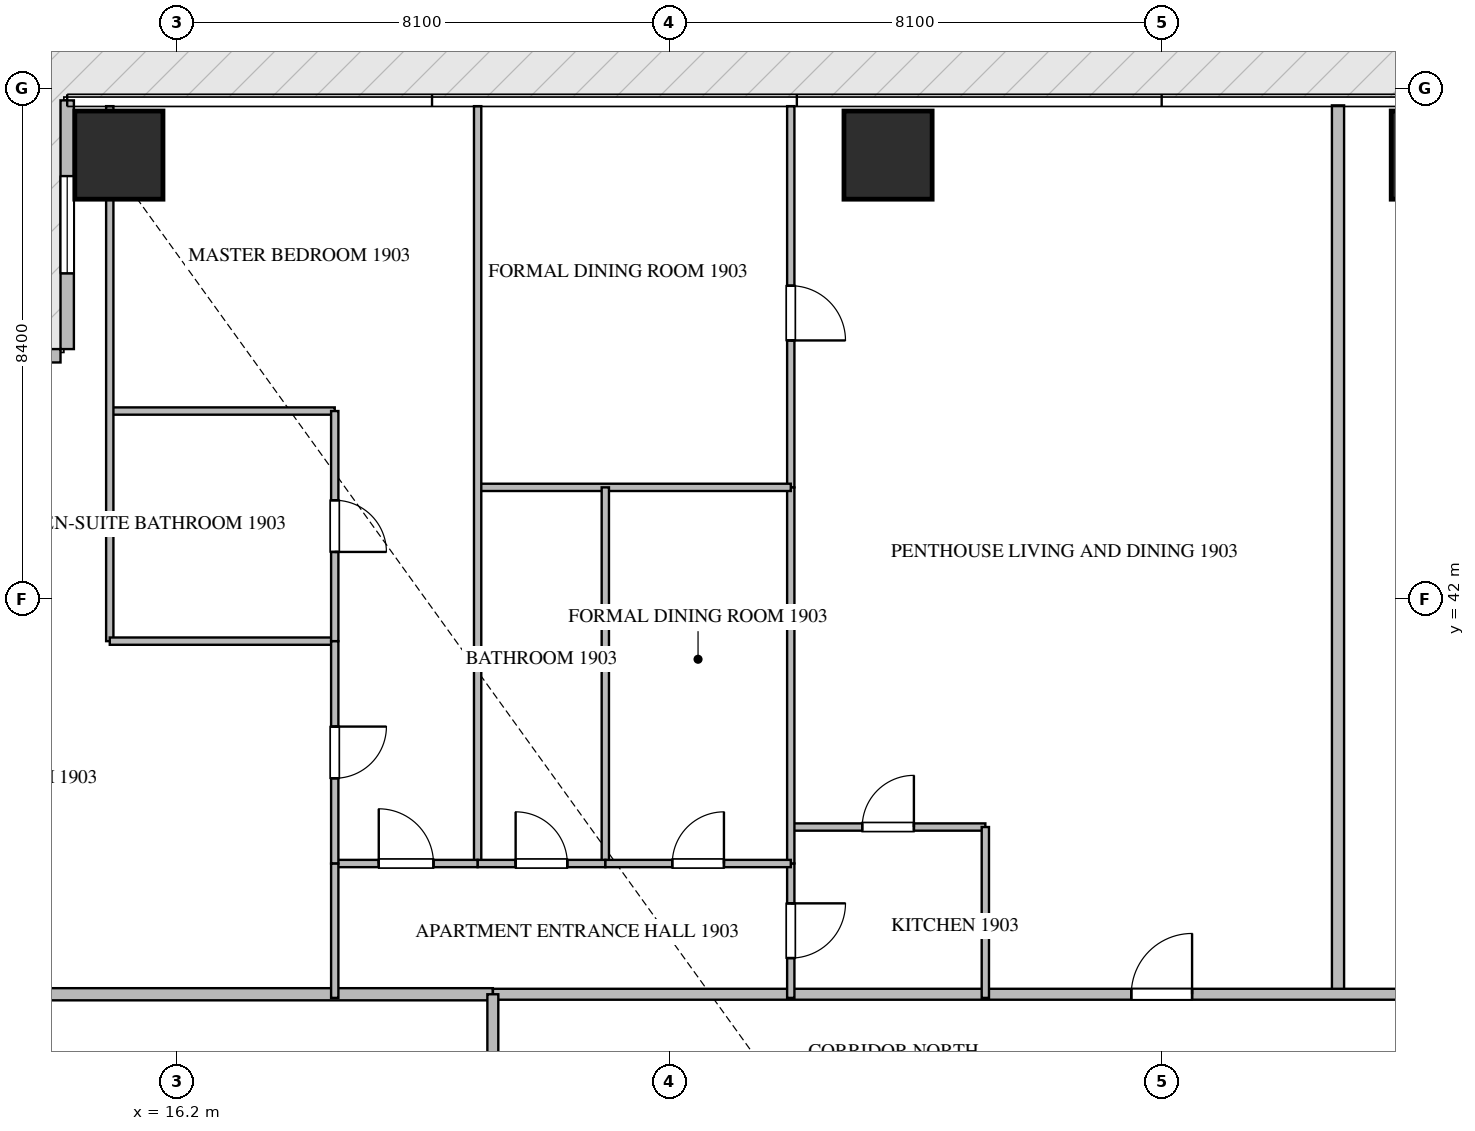
"""IFC4 building model, lengths in metres.
Left out: names, types, materials, properties, quantities, classifications, styles, units other than length and angle.
Written with IfcOpenShell. Run it as: python <this file> out.ifc"""

import sys

from ifc_helpers import new_model, si_unit, direction, frame, frame_2d, origin, origin_2d, place, context, subcontext, project, spatial, rectangle, extrude, source, transform, mapped, element, fill, save


model = new_model("IFC4")
c1 = context("Model", 3, precision=1e-05, world=origin(), true_north=direction((0.0, 1.0)))
c2 = subcontext(c1, "Body", "Model", "MODEL_VIEW")
j1 = project(units=[si_unit("LENGTHUNIT", "METRE"), si_unit("PLANEANGLEUNIT", "RADIAN")], contexts=[c1])
p1 = place(None, origin())
s1 = spatial("IfcSite", under=j1, at=p1, CompositionType="ELEMENT")
p2 = place(p1, origin())
s2 = spatial("IfcBuilding", under=s1, at=p2, CompositionType="ELEMENT")
p3 = place(p2, frame((0.0, 0.0, 79.2)))
s3 = spatial("IfcBuildingStorey", under=s2, at=p3, CompositionType="ELEMENT", Elevation=79.2)
m1 = source(origin(), c2, "Body", "SweptSolid", [
    extrude(rectangle(XDim=1.45, YDim=1.45, at=origin_2d()), origin(), (0.0, 0.0, 1.0), 3.75),
])
for number, where, z_axis, x_axis in (
    (1, (15.25, 49.3, -0.26), (0.0, 0.0, 1.0), (1.0, 0.0, 0.0)),
    (2, (27.9, 49.3, -0.26), (0.0, 0.0, 1.0), (1.0, 0.0, 0.0)),
    (3, (36.9, 49.3, -0.26), (0.0, 0.0, 1.0), (1.0, 0.0, 0.0)),
):
    element("IfcColumn", number, at=place(p3, frame(where, z_axis=z_axis, x_axis=x_axis)), inside=s3, PredefinedType="COLUMN", context=c2, shape_type="MappedRepresentation", body=[
        mapped(m1, transform((0.0, 0.0, 0.0), scale=1.0)),
    ])
p4 = place(p3, frame((14.4, 50.2, 0.0), z_axis=(0.0, 0.0, 1.0), x_axis=(0.0, -1.0, 0.0)))
e4 = element("IfcWall", 4, at=p4, inside=s3, PredefinedType="ELEMENTEDWALL", context=c2, shape_type="SweptSolid", body=[
    extrude(rectangle(XDim=4.09, YDim=0.22, at=frame_2d((2.045, 0.0))), origin(), (0.0, 0.0, 1.0), 3.475),
])
p5 = place(p4, frame((1.245, 0.0, 0.65)))
e5 = element("IfcOpeningElement", 5, at=p5, cuts=e4, PredefinedType="OPENING", context=c2, shape_type="SweptSolid", body=[
    extrude(rectangle(XDim=1.6, YDim=2.1, at=frame_2d((0.8, 1.05))), frame((0.0, 0.12, 0.0), z_axis=(0.0, -1.0, 0.0), x_axis=(1.0, 0.0, 0.0)), (0.0, 0.0, 1.0), 0.24),
])
p6 = place(p3, frame((14.29, 46.0, 0.0), z_axis=(0.0, 0.0, 1.0), x_axis=(-1.0, 0.0, 0.0)))
e6 = element("IfcWall", 6, at=p6, inside=s3, PredefinedType="ELEMENTEDWALL", context=c2, shape_type="SweptSolid", body=[
    extrude(rectangle(XDim=3.98, YDim=0.22, at=frame_2d((1.99, 0.0))), origin(), (0.0, 0.0, 1.0), 3.475),
])
p7 = place(p6, frame((1.19, 0.0, 0.65)))
e7 = element("IfcOpeningElement", 7, at=p7, cuts=e6, PredefinedType="OPENING", context=c2, shape_type="SweptSolid", body=[
    extrude(rectangle(XDim=1.6, YDim=2.1, at=frame_2d((0.8, 1.05))), frame((0.0, 0.12, 0.0), z_axis=(0.0, -1.0, 0.0), x_axis=(1.0, 0.0, 0.0)), (0.0, 0.0, 1.0), 0.24),
])
p8 = place(p3, frame((35.3, 35.5, 0.0), z_axis=(0.0, 0.0, 1.0), x_axis=(0.0, 1.0, 0.0)))
e8 = element("IfcWall", 8, at=p8, inside=s3, PredefinedType="PARTITIONING", context=c2, shape_type="SweptSolid", body=[
    extrude(rectangle(XDim=14.618, YDim=0.2, at=frame_2d((7.309, 0.0))), origin(), (0.0, 0.0, 1.0), 3.49),
])
p9 = place(p3, frame((6.082, 35.5, 0.0), z_axis=(0.0, 0.0, 1.0), x_axis=(1.0, 0.0, 0.0)))
e9 = element("IfcWall", 9, at=p9, inside=s3, PredefinedType="PARTITIONING", context=c2, shape_type="SweptSolid", body=[
    extrude(rectangle(XDim=15.318, YDim=0.2, at=frame_2d((7.659, 0.0))), origin(), (0.0, 0.0, 1.0), 3.49),
])
p10 = place(p3, frame((21.402, 35.5, 0.0), z_axis=(0.0, 0.0, 1.0), x_axis=(1.0, 0.0, 0.0)))
e10 = element("IfcWall", 10, at=p10, inside=s3, PredefinedType="PARTITIONING", context=c2, shape_type="SweptSolid", body=[
    extrude(rectangle(XDim=21.996, YDim=0.18, at=frame_2d((10.998, 0.0))), origin(), (0.0, 0.0, 1.0), 3.49),
])
p11 = place(p10, frame((10.498, 0.0, 0.0)))
e11 = element("IfcOpeningElement", 11, at=p11, cuts=e10, PredefinedType="OPENING", context=c2, shape_type="SweptSolid", body=[
    extrude(rectangle(XDim=1.0, YDim=2.15, at=frame_2d((0.5, 1.075))), frame((0.0, 0.1, 0.0), z_axis=(0.0, -1.0, 0.0), x_axis=(1.0, 0.0, 0.0)), (0.0, 0.0, 1.0), 0.2),
])
p12 = place(p10, frame((16.272, 0.0, 0.0)))
e12 = element("IfcOpeningElement", 12, at=p12, cuts=e10, PredefinedType="OPENING", context=c2, shape_type="SweptSolid", body=[
    extrude(rectangle(XDim=1.0, YDim=2.15, at=frame_2d((0.5, 1.075))), frame((0.0, 0.1, 0.0), z_axis=(0.0, -1.0, 0.0), x_axis=(1.0, 0.0, 0.0)), (0.0, 0.0, 1.0), 0.2),
])
p13 = place(p3, frame((21.4, 14.9, 0.0), z_axis=(0.0, 0.0, 1.0), x_axis=(0.0, 1.0, 0.0)))
e13 = element("IfcWall", 13, at=p13, inside=s3, PredefinedType="PARTITIONING", context=c2, shape_type="SweptSolid", body=[
    extrude(rectangle(XDim=20.6, YDim=0.18, at=frame_2d((10.3, 0.0))), origin(), (0.0, 0.0, 1.0), 3.49),
])
p14 = place(p13, frame((3.469, 0.0, 0.0)))
e14 = element("IfcOpeningElement", 14, at=p14, cuts=e13, PredefinedType="OPENING", context=c2, shape_type="SweptSolid", body=[
    extrude(rectangle(XDim=1.0, YDim=2.15, at=frame_2d((0.5, 1.075))), frame((0.0, 0.1, 0.0), z_axis=(0.0, -1.0, 0.0), x_axis=(1.0, 0.0, 0.0)), (0.0, 0.0, 1.0), 0.2),
])
p15 = place(p13, frame((11.172, 0.0, 0.0)))
e15 = element("IfcOpeningElement", 15, at=p15, cuts=e13, PredefinedType="OPENING", context=c2, shape_type="SweptSolid", body=[
    extrude(rectangle(XDim=1.0, YDim=2.15, at=frame_2d((0.5, 1.075))), frame((0.0, 0.1, 0.0), z_axis=(0.0, -1.0, 0.0), x_axis=(1.0, 0.0, 0.0)), (0.0, 0.0, 1.0), 0.2),
])
p16 = place(p13, frame((17.92, 0.0, 0.0)))
e16 = element("IfcOpeningElement", 16, at=p16, cuts=e13, PredefinedType="OPENING", context=c2, shape_type="SweptSolid", body=[
    extrude(rectangle(XDim=1.0, YDim=2.15, at=frame_2d((0.5, 1.075))), frame((0.0, 0.1, 0.0), z_axis=(0.0, -1.0, 0.0), x_axis=(1.0, 0.0, 0.0)), (0.0, 0.0, 1.0), 0.2),
])
p17 = place(p3, frame((26.3, 38.25, 0.0), z_axis=(0.0, 0.0, 1.0), x_axis=(1.0, 0.0, 0.0)))
e17 = element("IfcWall", 17, at=p17, inside=s3, PredefinedType="PARTITIONING", context=c2, shape_type="SweptSolid", body=[
    extrude(rectangle(XDim=3.2, YDim=0.12, at=frame_2d((1.6, 0.0))), origin(), (0.0, 0.0, 1.0), 3.49),
])
p18 = place(p17, frame((1.175, 0.0, 0.0)))
e18 = element("IfcOpeningElement", 18, at=p18, cuts=e17, PredefinedType="OPENING", context=c2, shape_type="SweptSolid", body=[
    extrude(rectangle(XDim=0.85, YDim=2.1, at=frame_2d((0.425, 1.05))), frame((0.0, 0.07, 0.0), z_axis=(0.0, -1.0, 0.0), x_axis=(1.0, 0.0, 0.0)), (0.0, 0.0, 1.0), 0.14),
])
p19 = place(p3, frame((29.5, 38.25, 0.0), z_axis=(0.0, 0.0, 1.0), x_axis=(0.0, -1.0, 0.0)))
e19 = element("IfcWall", 19, at=p19, inside=s3, PredefinedType="PARTITIONING", context=c2, shape_type="SweptSolid", body=[
    extrude(rectangle(XDim=2.81, YDim=0.12, at=frame_2d((1.405, 0.0))), origin(), (0.0, 0.0, 1.0), 3.49),
])
p20 = place(p3, frame((26.3, 37.65, 0.0), z_axis=(0.0, 0.0, 1.0), x_axis=(0.0, -1.0, 0.0)))
e20 = element("IfcWall", 20, at=p20, inside=s3, PredefinedType="PARTITIONING", context=c2, shape_type="SweptSolid", body=[
    extrude(rectangle(XDim=2.21, YDim=0.12, at=frame_2d((1.105, 0.0))), origin(), (0.0, 0.0, 1.0), 3.49),
])
p21 = place(p20, frame((0.655, 0.0, 0.0)))
e21 = element("IfcOpeningElement", 21, at=p21, cuts=e20, PredefinedType="OPENING", context=c2, shape_type="SweptSolid", body=[
    extrude(rectangle(XDim=0.9, YDim=2.1, at=frame_2d((0.45, 1.05))), frame((0.0, 0.07, 0.0), z_axis=(0.0, -1.0, 0.0), x_axis=(1.0, 0.0, 0.0)), (0.0, 0.0, 1.0), 0.14),
])
p22 = place(p3, frame((26.3, 50.105, 0.0), z_axis=(0.0, 0.0, 1.0), x_axis=(0.0, -1.0, 0.0)))
e22 = element("IfcWall", 22, at=p22, inside=s3, PredefinedType="PARTITIONING", context=c2, shape_type="SweptSolid", body=[
    extrude(rectangle(XDim=6.269, YDim=0.12, at=frame_2d((3.135, 0.0))), origin(), (0.0, 0.0, 1.0), 3.49),
])
p23 = place(p22, frame((2.953, 0.0, 0.0)))
e23 = element("IfcOpeningElement", 23, at=p23, cuts=e22, PredefinedType="OPENING", context=c2, shape_type="SweptSolid", body=[
    extrude(rectangle(XDim=0.9, YDim=2.1, at=frame_2d((0.45, 1.05))), frame((0.0, 0.07, 0.0), z_axis=(0.0, -1.0, 0.0), x_axis=(1.0, 0.0, 0.0)), (0.0, 0.0, 1.0), 0.14),
])
p24 = place(p3, frame((26.3, 43.834, 0.0), z_axis=(0.0, 0.0, 1.0), x_axis=(0.0, -1.0, 0.0)))
e24 = element("IfcWall", 24, at=p24, inside=s3, PredefinedType="PARTITIONING", context=c2, shape_type="SweptSolid", body=[
    extrude(rectangle(XDim=6.182, YDim=0.12, at=frame_2d((3.091, 0.0))), origin(), (0.0, 0.0, 1.0), 3.49),
])
p25 = place(p3, frame((21.15, 43.836, 0.0), z_axis=(0.0, 0.0, 1.0), x_axis=(1.0, 0.0, 0.0)))
e25 = element("IfcWall", 25, at=p25, inside=s3, PredefinedType="PARTITIONING", context=c2, shape_type="SweptSolid", body=[
    extrude(rectangle(XDim=5.15, YDim=0.12, at=frame_2d((2.575, 0.0))), origin(), (0.0, 0.0, 1.0), 3.49),
])
p26 = place(p3, frame((21.15, 50.105, 0.0), z_axis=(0.0, 0.0, 1.0), x_axis=(0.0, -1.0, 0.0)))
e26 = element("IfcWall", 26, at=p26, inside=s3, PredefinedType="PARTITIONING", context=c2, shape_type="SweptSolid", body=[
    extrude(rectangle(XDim=12.455, YDim=0.12, at=frame_2d((6.228, 0.0))), origin(), (0.0, 0.0, 1.0), 3.49),
])
p27 = place(p3, frame((23.25, 43.836, 0.0), z_axis=(0.0, 0.0, 1.0), x_axis=(0.0, -1.0, 0.0)))
e27 = element("IfcWall", 27, at=p27, inside=s3, PredefinedType="PARTITIONING", context=c2, shape_type="SweptSolid", body=[
    extrude(rectangle(XDim=6.186, YDim=0.12, at=frame_2d((3.093, 0.0))), origin(), (0.0, 0.0, 1.0), 3.49),
])
p28 = place(p3, frame((21.15, 37.65, 0.0), z_axis=(0.0, 0.0, 1.0), x_axis=(1.0, 0.0, 0.0)))
e28 = element("IfcWall", 28, at=p28, inside=s3, PredefinedType="PARTITIONING", context=c2, shape_type="SweptSolid", body=[
    extrude(rectangle(XDim=2.1, YDim=0.12, at=frame_2d((1.05, 0.0))), origin(), (0.0, 0.0, 1.0), 3.49),
])
p29 = place(p28, frame((0.625, 0.0, 0.0)))
e29 = element("IfcOpeningElement", 29, at=p29, cuts=e28, PredefinedType="OPENING", context=c2, shape_type="SweptSolid", body=[
    extrude(rectangle(XDim=0.85, YDim=2.1, at=frame_2d((0.425, 1.05))), frame((0.0, 0.07, 0.0), z_axis=(0.0, -1.0, 0.0), x_axis=(1.0, 0.0, 0.0)), (0.0, 0.0, 1.0), 0.14),
])
p30 = place(p3, frame((23.252, 37.65, 0.0), z_axis=(0.0, 0.0, 1.0), x_axis=(1.0, 0.0, 0.0)))
e30 = element("IfcWall", 30, at=p30, inside=s3, PredefinedType="PARTITIONING", context=c2, shape_type="SweptSolid", body=[
    extrude(rectangle(XDim=3.048, YDim=0.12, at=frame_2d((1.524, 0.0))), origin(), (0.0, 0.0, 1.0), 3.49),
])
p31 = place(p30, frame((1.099, 0.0, 0.0)))
e31 = element("IfcOpeningElement", 31, at=p31, cuts=e30, PredefinedType="OPENING", context=c2, shape_type="SweptSolid", body=[
    extrude(rectangle(XDim=0.85, YDim=2.1, at=frame_2d((0.425, 1.05))), frame((0.0, 0.07, 0.0), z_axis=(0.0, -1.0, 0.0), x_axis=(1.0, 0.0, 0.0)), (0.0, 0.0, 1.0), 0.14),
])
p32 = place(p3, frame((18.8, 37.65, 0.0), z_axis=(0.0, 0.0, 1.0), x_axis=(1.0, 0.0, 0.0)))
e32 = element("IfcWall", 32, at=p32, inside=s3, PredefinedType="PARTITIONING", context=c2, shape_type="SweptSolid", body=[
    extrude(rectangle(XDim=2.348, YDim=0.12, at=frame_2d((1.174, 0.0))), origin(), (0.0, 0.0, 1.0), 3.49),
])
p33 = place(p32, frame((0.724, 0.0, 0.0)))
e33 = element("IfcOpeningElement", 33, at=p33, cuts=e32, PredefinedType="OPENING", context=c2, shape_type="SweptSolid", body=[
    extrude(rectangle(XDim=0.9, YDim=2.1, at=frame_2d((0.45, 1.05))), frame((0.0, 0.07, 0.0), z_axis=(0.0, -1.0, 0.0), x_axis=(1.0, 0.0, 0.0)), (0.0, 0.0, 1.0), 0.14),
])
p34 = place(p3, frame((15.1, 45.091, 0.0), z_axis=(0.0, 0.0, 1.0), x_axis=(1.0, 0.0, 0.0)))
e34 = element("IfcWall", 34, at=p34, inside=s3, PredefinedType="PARTITIONING", context=c2, shape_type="SweptSolid", body=[
    extrude(rectangle(XDim=3.7, YDim=0.12, at=frame_2d((1.85, 0.0))), origin(), (0.0, 0.0, 1.0), 3.49),
])
p35 = place(p3, frame((15.1, 50.105, 0.0), z_axis=(0.0, 0.0, 1.0), x_axis=(0.0, -1.0, 0.0)))
e35 = element("IfcWall", 35, at=p35, inside=s3, PredefinedType="PARTITIONING", context=c2, shape_type="SweptSolid", body=[
    extrude(rectangle(XDim=8.798, YDim=0.12, at=frame_2d((4.399, 0.0))), origin(), (0.0, 0.0, 1.0), 2.922),
])
p36 = place(p3, frame((15.1, 41.307, 0.0), z_axis=(0.0, 0.0, 1.0), x_axis=(1.0, 0.0, 0.0)))
e36 = element("IfcWall", 36, at=p36, inside=s3, PredefinedType="PARTITIONING", context=c2, shape_type="SweptSolid", body=[
    extrude(rectangle(XDim=3.7, YDim=0.12, at=frame_2d((1.85, 0.0))), origin(), (0.0, 0.0, 1.0), 3.49),
])
p37 = place(p3, frame((18.8, 45.091, 0.0), z_axis=(0.0, 0.0, 1.0), x_axis=(0.0, -1.0, 0.0)))
e37 = element("IfcWall", 37, at=p37, inside=s3, PredefinedType="PARTITIONING", context=c2, shape_type="SweptSolid", body=[
    extrude(rectangle(XDim=3.784, YDim=0.12, at=frame_2d((1.892, 0.0))), origin(), (0.0, 0.0, 1.0), 3.49),
])
p38 = place(p37, frame((1.467, 0.0, 0.0)))
e38 = element("IfcOpeningElement", 38, at=p38, cuts=e37, PredefinedType="OPENING", context=c2, shape_type="SweptSolid", body=[
    extrude(rectangle(XDim=0.85, YDim=2.1, at=frame_2d((0.425, 1.05))), frame((0.0, 0.07, 0.0), z_axis=(0.0, -1.0, 0.0), x_axis=(1.0, 0.0, 0.0)), (0.0, 0.0, 1.0), 0.14),
])
p39 = place(p3, frame((18.8, 41.305, 0.0), z_axis=(0.0, 0.0, 1.0), x_axis=(0.0, -1.0, 0.0)))
e39 = element("IfcWall", 39, at=p39, inside=s3, PredefinedType="PARTITIONING", context=c2, shape_type="SweptSolid", body=[
    extrude(rectangle(XDim=3.655, YDim=0.12, at=frame_2d((1.828, 0.0))), origin(), (0.0, 0.0, 1.0), 3.49),
])
p40 = place(p39, frame((1.403, 0.0, 0.0)))
e40 = element("IfcOpeningElement", 40, at=p40, cuts=e39, PredefinedType="OPENING", context=c2, shape_type="SweptSolid", body=[
    extrude(rectangle(XDim=0.85, YDim=2.1, at=frame_2d((0.425, 1.05))), frame((0.0, 0.07, 0.0), z_axis=(0.0, -1.0, 0.0), x_axis=(1.0, 0.0, 0.0)), (0.0, 0.0, 1.0), 0.14),
])
p41 = place(p3, frame((18.8, 37.648, 0.0), z_axis=(0.0, 0.0, 1.0), x_axis=(0.0, -1.0, 0.0)))
e41 = element("IfcWall", 41, at=p41, inside=s3, PredefinedType="PARTITIONING", context=c2, shape_type="SweptSolid", body=[
    extrude(rectangle(XDim=2.208, YDim=0.12, at=frame_2d((1.104, 0.0))), origin(), (0.0, 0.0, 1.0), 3.49),
])
m2 = source(origin(), c2, "Body", "SweptSolid", [
    extrude(rectangle(XDim=1.6, YDim=2.1, at=frame_2d((0.8, 1.05))), frame((0.0, 0.03, 0.0), z_axis=(0.0, -1.0, 0.0), x_axis=(1.0, 0.0, 0.0)), (0.0, 0.0, 1.0), 0.06),
])
p42 = place(p5, origin())
e42 = element("IfcWindow", 42, at=p42, inside=s3, PartitioningType="SINGLE_PANEL", PredefinedType="WINDOW", context=c2, shape_type="MappedRepresentation", body=[
    mapped(m2, transform((0.0, 0.0, 0.0), scale=1.0)),
])
fill(e5, e42)
m3 = source(origin(), c2, "Body", "SweptSolid", [
    extrude(rectangle(XDim=1.0, YDim=2.15, at=frame_2d((0.5, 1.075))), frame((0.0, 0.025, 0.0), z_axis=(0.0, -1.0, 0.0), x_axis=(1.0, 0.0, 0.0)), (0.0, 0.0, 1.0), 0.05),
])
p43 = place(p11, origin())
e43 = element("IfcDoor", 43, at=p43, inside=s3, OperationType="SINGLE_SWING_RIGHT", PredefinedType="DOOR", context=c2, shape_type="MappedRepresentation", body=[
    mapped(m3, transform((0.0, 0.0, 0.0), scale=1.0)),
])
fill(e11, e43)
m4 = source(origin(), c2, "Body", "SweptSolid", [
    extrude(rectangle(XDim=0.85, YDim=2.1, at=frame_2d((0.425, 1.05))), frame((0.0, 0.025, 0.0), z_axis=(0.0, -1.0, 0.0), x_axis=(1.0, 0.0, 0.0)), (0.0, 0.0, 1.0), 0.05),
])
p44 = place(p18, origin())
e44 = element("IfcDoor", 44, at=p44, inside=s3, OperationType="SINGLE_SWING_RIGHT", PredefinedType="DOOR", context=c2, shape_type="MappedRepresentation", body=[
    mapped(m4, transform((0.0, 0.0, 0.0), scale=1.0)),
])
fill(e18, e44)
m5 = source(origin(), c2, "Body", "SweptSolid", [
    extrude(rectangle(XDim=0.9, YDim=2.1, at=frame_2d((0.45, 1.05))), frame((0.0, 0.025, 0.0), z_axis=(0.0, -1.0, 0.0), x_axis=(1.0, 0.0, 0.0)), (0.0, 0.0, 1.0), 0.05),
])
p45 = place(p21, origin())
e45 = element("IfcDoor", 45, at=p45, inside=s3, OperationType="SINGLE_SWING_LEFT", PredefinedType="DOOR", context=c2, shape_type="MappedRepresentation", body=[
    mapped(m5, transform((0.0, 0.0, 0.0), scale=1.0)),
])
fill(e21, e45)
p46 = place(p23, origin())
e46 = element("IfcDoor", 46, at=p46, inside=s3, OperationType="SINGLE_SWING_RIGHT", PredefinedType="DOOR", context=c2, shape_type="MappedRepresentation", body=[
    mapped(m5, transform((0.0, 0.0, 0.0), scale=1.0)),
])
fill(e23, e46)
p47 = place(p29, origin())
e47 = element("IfcDoor", 47, at=p47, inside=s3, OperationType="SINGLE_SWING_LEFT", PredefinedType="DOOR", context=c2, shape_type="MappedRepresentation", body=[
    mapped(m4, transform((0.0, 0.0, 0.0), scale=1.0)),
])
fill(e29, e47)
p48 = place(p31, origin())
e48 = element("IfcDoor", 48, at=p48, inside=s3, OperationType="SINGLE_SWING_RIGHT", PredefinedType="DOOR", context=c2, shape_type="MappedRepresentation", body=[
    mapped(m4, transform((0.0, 0.0, 0.0), scale=1.0)),
])
fill(e31, e48)
p49 = place(p33, origin())
e49 = element("IfcDoor", 49, at=p49, inside=s3, OperationType="SINGLE_SWING_LEFT", PredefinedType="DOOR", context=c2, shape_type="MappedRepresentation", body=[
    mapped(m5, transform((0.0, 0.0, 0.0), scale=1.0)),
])
fill(e33, e49)
p50 = place(p38, origin())
e50 = element("IfcDoor", 50, at=p50, inside=s3, OperationType="SINGLE_SWING_RIGHT", PredefinedType="DOOR", context=c2, shape_type="MappedRepresentation", body=[
    mapped(m4, transform((0.0, 0.0, 0.0), scale=1.0)),
])
fill(e38, e50)
p51 = place(p40, origin())
e51 = element("IfcDoor", 51, at=p51, inside=s3, OperationType="SINGLE_SWING_LEFT", PredefinedType="DOOR", context=c2, shape_type="MappedRepresentation", body=[
    mapped(m4, transform((0.0, 0.0, 0.0), scale=1.0)),
])
fill(e40, e51)
save(model, sys.argv[1])
